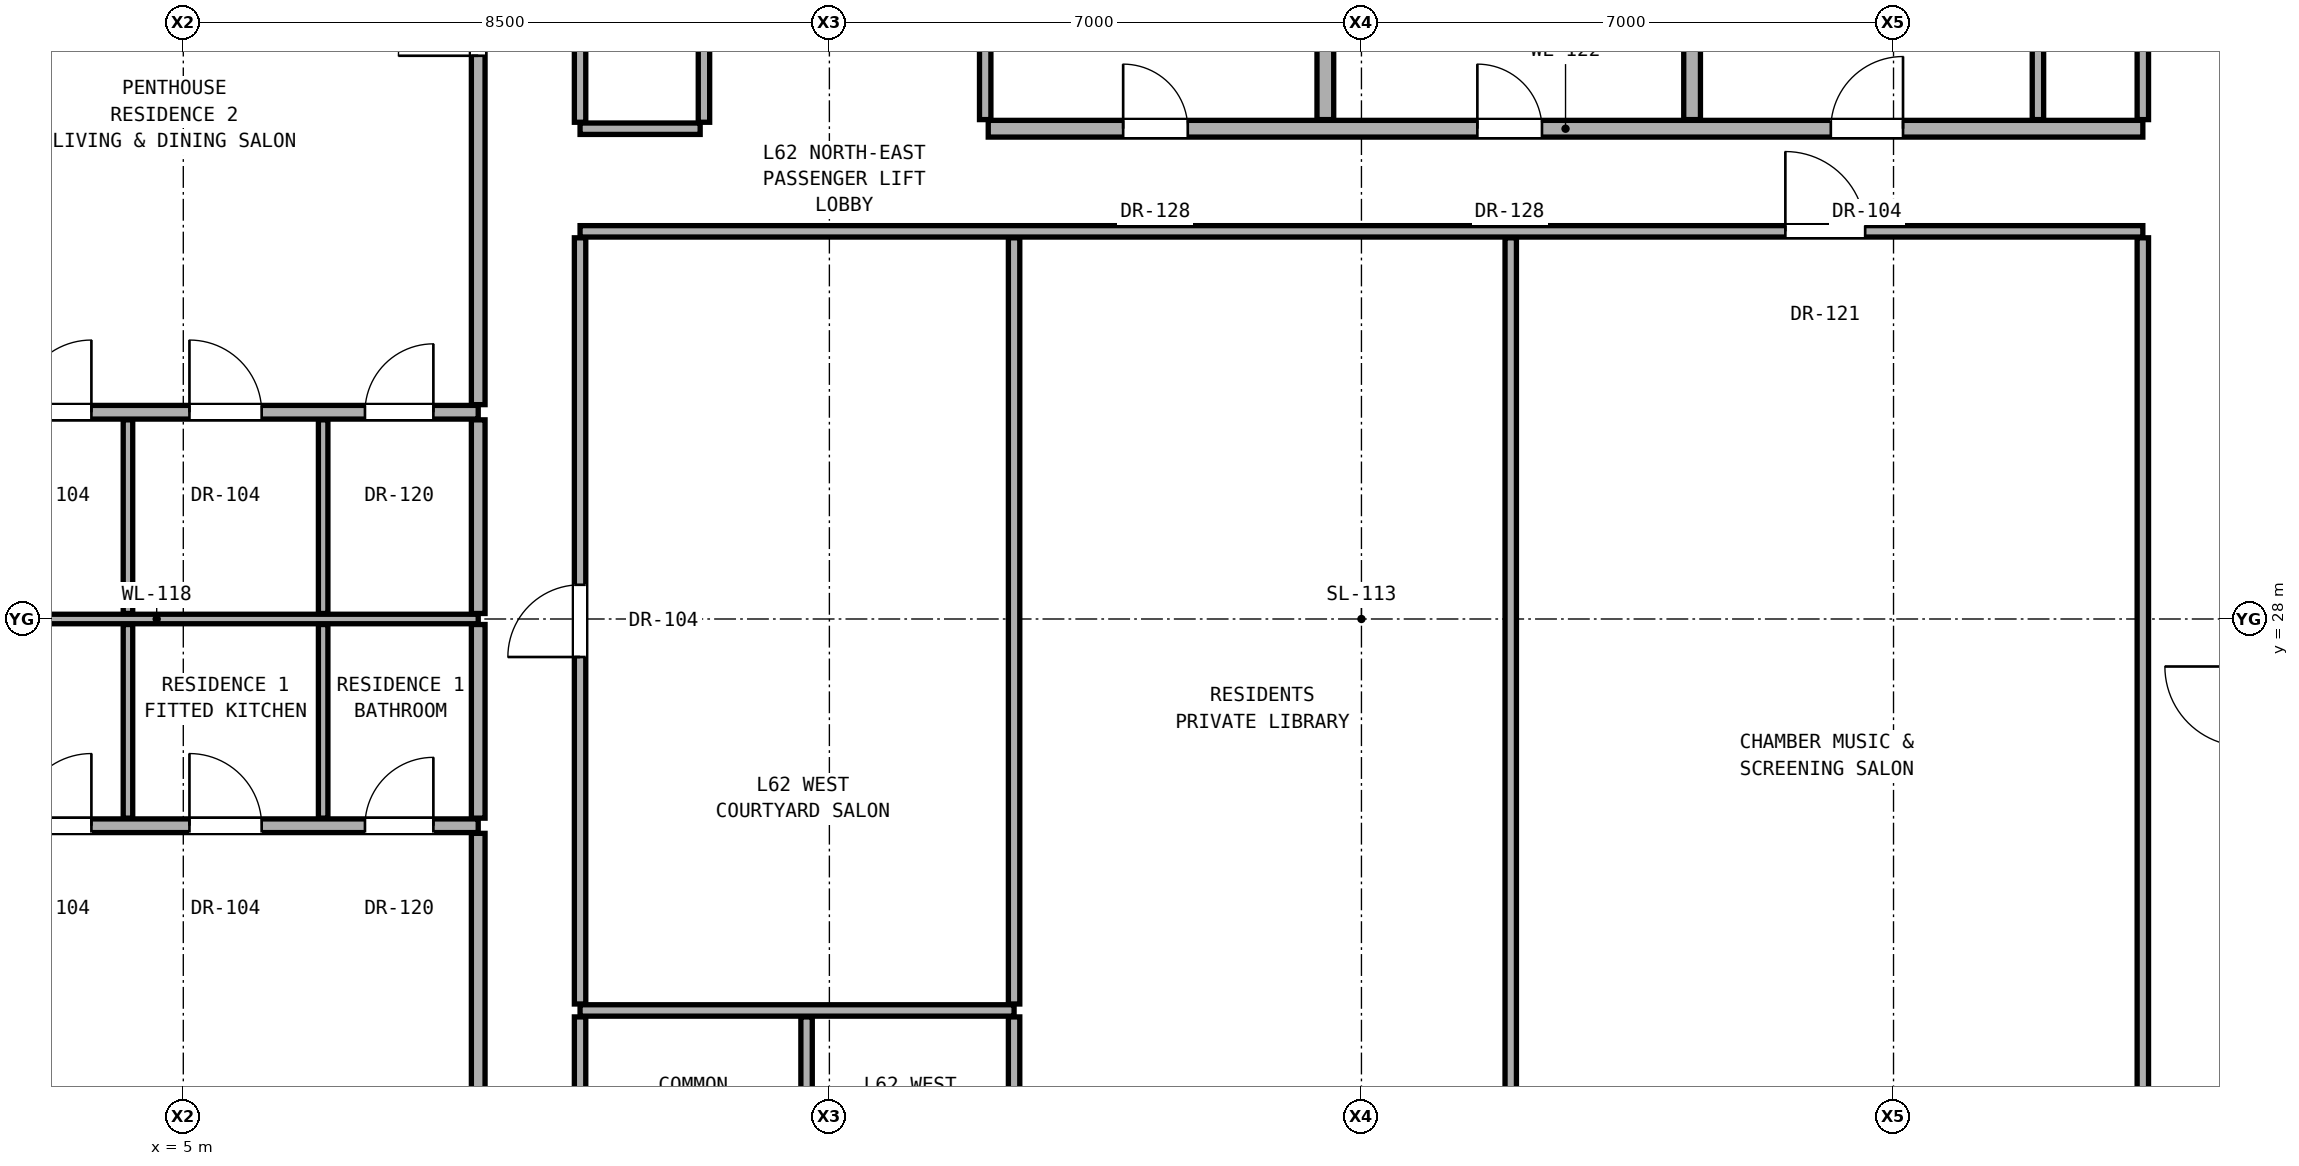
"""IFC4 building model, lengths in metres.
Left out: names, types, materials, properties, quantities, classifications, styles, units other than length and angle.
Written with IfcOpenShell. Run it as: python <this file> out.ifc"""

import sys

from ifc_helpers import new_model, si_unit, direction, frame, frame_2d, origin, place, context, subcontext, project, spatial, rectangle, extrude, element, fill, save


model = new_model("IFC4")
c1 = context("Model", 3, precision=1e-05, world=origin(), true_north=direction((0.0, 1.0)))
c2 = subcontext(c1, "Body", "Model", "MODEL_VIEW")
j1 = project(units=[si_unit("LENGTHUNIT", "METRE"), si_unit("PLANEANGLEUNIT", "RADIAN")], contexts=[c1])
p1 = place(None, origin())
s1 = spatial("IfcSite", under=j1, at=p1, CompositionType="ELEMENT")
p2 = place(p1, origin())
s2 = spatial("IfcBuilding", under=s1, at=p2, CompositionType="ELEMENT")
p3 = place(p2, frame((0.0, 0.0, 219.4)))
s3 = spatial("IfcBuildingStorey", under=s2, at=p3, CompositionType="ELEMENT", Elevation=219.4)
p4 = place(p3, frame((10.22, 22.85, 0.0), z_axis=(0.0, 0.0, 1.0), x_axis=(1.0, 0.0, 0.0)))
e1 = element("IfcWall", 1, at=p4, inside=s3, PredefinedType="PARTITIONING", context=c2, shape_type="SweptSolid", body=[
    extrude(rectangle(XDim=5.71, YDim=0.15, at=frame_2d((2.855, 0.0))), origin(), (0.0, 0.0, 1.0), 2.236),
])
p5 = place(p3, frame((0.42, 25.28, 0.0), z_axis=(0.0, 0.0, 1.0), x_axis=(1.0, 0.0, 0.0)))
e2 = element("IfcWall", 2, at=p5, inside=s3, PredefinedType="PARTITIONING", context=c2, shape_type="SweptSolid", body=[
    extrude(rectangle(XDim=8.46, YDim=0.18, at=frame_2d((4.23, 0.0))), origin(), (0.0, 0.0, 1.0), 2.319),
])
p6 = place(p5, frame((2.421, 0.0, 0.0)))
e3 = element("IfcOpeningElement", 3, at=p6, cuts=e2, PredefinedType="OPENING", context=c2, shape_type="SweptSolid", body=[
    extrude(rectangle(XDim=0.95, YDim=2.15, at=frame_2d((0.475, 1.075))), frame((0.0, 0.1, 0.0), z_axis=(0.0, -1.0, 0.0), x_axis=(1.0, 0.0, 0.0)), (0.0, 0.0, 1.0), 0.2),
])
p7 = place(p5, frame((4.661, 0.0, 0.0)))
e4 = element("IfcOpeningElement", 4, at=p7, cuts=e2, PredefinedType="OPENING", context=c2, shape_type="SweptSolid", body=[
    extrude(rectangle(XDim=0.95, YDim=2.15, at=frame_2d((0.475, 1.075))), frame((0.0, 0.1, 0.0), z_axis=(0.0, -1.0, 0.0), x_axis=(1.0, 0.0, 0.0)), (0.0, 0.0, 1.0), 0.2),
])
p8 = place(p5, frame((6.97, 0.0, 0.0)))
e5 = element("IfcOpeningElement", 5, at=p8, cuts=e2, PredefinedType="OPENING", context=c2, shape_type="SweptSolid", body=[
    extrude(rectangle(XDim=0.9, YDim=2.1, at=frame_2d((0.45, 1.05))), frame((0.0, 0.1, 0.0), z_axis=(0.0, -1.0, 0.0), x_axis=(1.0, 0.0, 0.0)), (0.0, 0.0, 1.0), 0.2),
])
p9 = place(p3, frame((0.42, 28.0, 0.0), z_axis=(0.0, 0.0, 1.0), x_axis=(1.0, 0.0, 0.0)))
e6 = element("IfcWall", 6, at=p9, inside=s3, PredefinedType="PARTITIONING", context=c2, shape_type="SweptSolid", body=[
    extrude(rectangle(XDim=8.46, YDim=0.125, at=frame_2d((4.23, 0.0))), origin(), (0.0, 0.0, 1.0), 2.319),
])
p10 = place(p3, frame((0.42, 30.72, 0.0), z_axis=(0.0, 0.0, 1.0), x_axis=(1.0, 0.0, 0.0)))
e7 = element("IfcWall", 7, at=p10, inside=s3, PredefinedType="PARTITIONING", context=c2, shape_type="SweptSolid", body=[
    extrude(rectangle(XDim=8.46, YDim=0.18, at=frame_2d((4.23, 0.0))), origin(), (0.0, 0.0, 1.0), 2.319),
])
p11 = place(p10, frame((2.421, 0.0, 0.0)))
e8 = element("IfcOpeningElement", 8, at=p11, cuts=e7, PredefinedType="OPENING", context=c2, shape_type="SweptSolid", body=[
    extrude(rectangle(XDim=0.95, YDim=2.15, at=frame_2d((0.475, 1.075))), frame((0.0, 0.1, 0.0), z_axis=(0.0, -1.0, 0.0), x_axis=(1.0, 0.0, 0.0)), (0.0, 0.0, 1.0), 0.2),
])
p12 = place(p10, frame((4.661, 0.0, 0.0)))
e9 = element("IfcOpeningElement", 9, at=p12, cuts=e7, PredefinedType="OPENING", context=c2, shape_type="SweptSolid", body=[
    extrude(rectangle(XDim=0.95, YDim=2.15, at=frame_2d((0.475, 1.075))), frame((0.0, 0.1, 0.0), z_axis=(0.0, -1.0, 0.0), x_axis=(1.0, 0.0, 0.0)), (0.0, 0.0, 1.0), 0.2),
])
p13 = place(p10, frame((6.97, 0.0, 0.0)))
e10 = element("IfcOpeningElement", 10, at=p13, cuts=e7, PredefinedType="OPENING", context=c2, shape_type="SweptSolid", body=[
    extrude(rectangle(XDim=0.9, YDim=2.1, at=frame_2d((0.45, 1.05))), frame((0.0, 0.1, 0.0), z_axis=(0.0, -1.0, 0.0), x_axis=(1.0, 0.0, 0.0)), (0.0, 0.0, 1.0), 0.2),
])
p14 = place(p3, frame((10.22, 33.1, 0.0), z_axis=(0.0, 0.0, 1.0), x_axis=(1.0, 0.0, 0.0)))
e11 = element("IfcWall", 11, at=p14, inside=s3, PredefinedType="PARTITIONING", context=c2, shape_type="SweptSolid", body=[
    extrude(rectangle(XDim=20.56, YDim=0.15, at=frame_2d((10.28, 0.0))), origin(), (0.0, 0.0, 1.0), 2.236),
])
p15 = place(p14, frame((15.857, 0.0, 0.0)))
e12 = element("IfcOpeningElement", 12, at=p15, cuts=e11, PredefinedType="OPENING", context=c2, shape_type="SweptSolid", body=[
    extrude(rectangle(XDim=1.05, YDim=2.2, at=frame_2d((0.525, 1.1))), frame((0.0, 0.085, 0.0), z_axis=(0.0, -1.0, 0.0), x_axis=(1.0, 0.0, 0.0)), (0.0, 0.0, 1.0), 0.17),
])
p16 = place(p3, frame((10.22, 34.45, 0.0), z_axis=(0.0, 0.0, 1.0), x_axis=(1.0, 0.0, 0.0)))
e13 = element("IfcWall", 13, at=p16, inside=s3, PredefinedType="PARTITIONING", context=c2, shape_type="SweptSolid", body=[
    extrude(rectangle(XDim=1.58, YDim=0.15, at=frame_2d((0.79, 0.0))), origin(), (0.0, 0.0, 1.0), 2.236),
])
p17 = place(p3, frame((15.59, 34.45, 0.0), z_axis=(0.0, 0.0, 1.0), x_axis=(1.0, 0.0, 0.0)))
e14 = element("IfcWall", 14, at=p17, inside=s3, PredefinedType="SOLIDWALL", context=c2, shape_type="SweptSolid", body=[
    extrude(rectangle(XDim=15.19, YDim=0.22, at=frame_2d((7.595, 0.0))), origin(), (0.0, 0.0, 1.0), 2.236),
])
p18 = place(p17, frame((6.435, 0.0, 0.0)))
e15 = element("IfcOpeningElement", 15, at=p18, cuts=e14, PredefinedType="OPENING", context=c2, shape_type="SweptSolid", body=[
    extrude(rectangle(XDim=0.85, YDim=2.01, at=frame_2d((0.425, 1.005))), frame((0.0, 0.12, 0.0), z_axis=(0.0, -1.0, 0.0), x_axis=(1.0, 0.0, 0.0)), (0.0, 0.0, 1.0), 0.24),
])
p19 = place(p17, frame((11.085, 0.0, 0.0)))
e16 = element("IfcOpeningElement", 16, at=p19, cuts=e14, PredefinedType="OPENING", context=c2, shape_type="SweptSolid", body=[
    extrude(rectangle(XDim=0.95, YDim=2.15, at=frame_2d((0.475, 1.075))), frame((0.0, 0.12, 0.0), z_axis=(0.0, -1.0, 0.0), x_axis=(1.0, 0.0, 0.0)), (0.0, 0.0, 1.0), 0.24),
])
p20 = place(p17, frame((1.775, 0.0, 0.0)))
e17 = element("IfcOpeningElement", 17, at=p20, cuts=e14, PredefinedType="OPENING", context=c2, shape_type="SweptSolid", body=[
    extrude(rectangle(XDim=0.85, YDim=2.01, at=frame_2d((0.425, 1.005))), frame((0.0, 0.12, 0.0), z_axis=(0.0, -1.0, 0.0), x_axis=(1.0, 0.0, 0.0)), (0.0, 0.0, 1.0), 0.24),
])
for number, where, z_axis, x_axis in (
    (18, (4.272, 25.38, 0.0), (0.0, 0.0, 1.0), (0.0, 1.0, 0.0)),
    (19, (4.272, 28.073, 0.0), (0.0, 0.0, 1.0), (0.0, 1.0, 0.0)),
    (20, (6.84, 25.38, 0.0), (0.0, 0.0, 1.0), (0.0, 1.0, 0.0)),
    (21, (6.84, 28.073, 0.0), (0.0, 0.0, 1.0), (0.0, 1.0, 0.0)),
):
    element("IfcWall", number, at=place(p3, frame(where, z_axis=z_axis, x_axis=x_axis)), inside=s3, PredefinedType="PARTITIONING", context=c2, shape_type="SweptSolid", body=[
        extrude(rectangle(XDim=2.548, YDim=0.125, at=frame_2d((1.274, 0.0))), origin(), (0.0, 0.0, 1.0), 3.1),
    ])
p21 = place(p3, frame((8.88, 14.95, 0.0), z_axis=(0.0, 0.0, 1.0), x_axis=(0.0, 1.0, 0.0)))
e22 = element("IfcWall", 22, at=p21, inside=s3, PredefinedType="PARTITIONING", context=c2, shape_type="SweptSolid", body=[
    extrude(rectangle(XDim=10.23, YDim=0.18, at=frame_2d((5.115, 0.0))), origin(), (0.0, 0.0, 1.0), 2.396),
])
p22 = place(p21, frame((4.59, 0.0, 0.0)))
e23 = element("IfcOpeningElement", 23, at=p22, cuts=e22, PredefinedType="OPENING", context=c2, shape_type="SweptSolid", body=[
    extrude(rectangle(XDim=1.05, YDim=2.2, at=frame_2d((0.525, 1.1))), frame((0.0, 0.1, 0.0), z_axis=(0.0, -1.0, 0.0), x_axis=(1.0, 0.0, 0.0)), (0.0, 0.0, 1.0), 0.2),
])
for number, where, z_axis, x_axis in (
    (24, (8.88, 25.38, 0.0), (0.0, 0.0, 1.0), (0.0, 1.0, 0.0)),
    (25, (8.88, 28.073, 0.0), (0.0, 0.0, 1.0), (0.0, 1.0, 0.0)),
):
    element("IfcWall", number, at=place(p3, frame(where, z_axis=z_axis, x_axis=x_axis)), inside=s3, PredefinedType="PARTITIONING", context=c2, shape_type="SweptSolid", body=[
        extrude(rectangle(XDim=2.548, YDim=0.18, at=frame_2d((1.274, 0.0))), origin(), (0.0, 0.0, 1.0), 3.1),
    ])
p23 = place(p3, frame((8.88, 30.82, 0.0), z_axis=(0.0, 0.0, 1.0), x_axis=(0.0, 1.0, 0.0)))
e26 = element("IfcWall", 26, at=p23, inside=s3, PredefinedType="PARTITIONING", context=c2, shape_type="SweptSolid", body=[
    extrude(rectangle(XDim=10.23, YDim=0.18, at=frame_2d((5.115, 0.0))), origin(), (0.0, 0.0, 1.0), 2.396),
])
p24 = place(p23, frame((4.59, 0.0, 0.0)))
e27 = element("IfcOpeningElement", 27, at=p24, cuts=e26, PredefinedType="OPENING", context=c2, shape_type="SweptSolid", body=[
    extrude(rectangle(XDim=1.05, YDim=2.2, at=frame_2d((0.525, 1.1))), frame((0.0, 0.1, 0.0), z_axis=(0.0, -1.0, 0.0), x_axis=(1.0, 0.0, 0.0)), (0.0, 0.0, 1.0), 0.2),
])
p25 = place(p3, frame((10.22, 19.985, 0.0), z_axis=(0.0, 0.0, 1.0), x_axis=(0.0, 1.0, 0.0)))
e28 = element("IfcWall", 28, at=p25, inside=s3, PredefinedType="PARTITIONING", context=c2, shape_type="SweptSolid", body=[
    extrude(rectangle(XDim=2.78, YDim=0.15, at=frame_2d((1.39, 0.0))), origin(), (0.0, 0.0, 1.0), 3.1),
])
p26 = place(p3, frame((10.22, 22.935, 0.0), z_axis=(0.0, 0.0, 1.0), x_axis=(0.0, 1.0, 0.0)))
e29 = element("IfcWall", 29, at=p26, inside=s3, PredefinedType="PARTITIONING", context=c2, shape_type="SweptSolid", body=[
    extrude(rectangle(XDim=10.08, YDim=0.15, at=frame_2d((5.04, 0.0))), origin(), (0.0, 0.0, 1.0), 2.396),
])
p27 = place(p26, frame((4.565, 0.0, 0.0)))
e30 = element("IfcOpeningElement", 30, at=p27, cuts=e29, PredefinedType="OPENING", context=c2, shape_type="SweptSolid", body=[
    extrude(rectangle(XDim=0.95, YDim=2.15, at=frame_2d((0.475, 1.075))), frame((0.0, 0.085, 0.0), z_axis=(0.0, -1.0, 0.0), x_axis=(1.0, 0.0, 0.0)), (0.0, 0.0, 1.0), 0.17),
])
p28 = place(p3, frame((10.22, 34.535, 0.0), z_axis=(0.0, 0.0, 1.0), x_axis=(0.0, 1.0, 0.0)))
e31 = element("IfcWall", 31, at=p28, inside=s3, PredefinedType="PARTITIONING", context=c2, shape_type="SweptSolid", body=[
    extrude(rectangle(XDim=9.13, YDim=0.15, at=frame_2d((4.565, 0.0))), origin(), (0.0, 0.0, 1.0), 2.492),
])
p29 = place(p3, frame((11.85, 34.535, 0.0), z_axis=(0.0, 0.0, 1.0), x_axis=(0.0, 1.0, 0.0)))
e32 = element("IfcWall", 32, at=p29, inside=s3, PredefinedType="PARTITIONING", context=c2, shape_type="SweptSolid", body=[
    extrude(rectangle(XDim=2.845, YDim=0.15, at=frame_2d((1.422, 0.0))), origin(), (0.0, 0.0, 1.0), 3.1),
])
p30 = place(p3, frame((13.2, 19.985, 0.0), z_axis=(0.0, 0.0, 1.0), x_axis=(0.0, 1.0, 0.0)))
e33 = element("IfcWall", 33, at=p30, inside=s3, PredefinedType="PARTITIONING", context=c2, shape_type="SweptSolid", body=[
    extrude(rectangle(XDim=2.78, YDim=0.15, at=frame_2d((1.39, 0.0))), origin(), (0.0, 0.0, 1.0), 3.1),
])
p31 = place(p3, frame((15.55, 34.57, 0.0), z_axis=(0.0, 0.0, 1.0), x_axis=(0.0, 1.0, 0.0)))
e34 = element("IfcWall", 34, at=p31, inside=s3, PredefinedType="PARTITIONING", context=c2, shape_type="SweptSolid", body=[
    extrude(rectangle(XDim=2.81, YDim=0.15, at=frame_2d((1.405, 0.0))), origin(), (0.0, 0.0, 1.0), 3.1),
])
p32 = place(p3, frame((15.93, 19.985, 0.0), z_axis=(0.0, 0.0, 1.0), x_axis=(0.0, 1.0, 0.0)))
e35 = element("IfcWall", 35, at=p32, inside=s3, PredefinedType="PARTITIONING", context=c2, shape_type="SweptSolid", body=[
    extrude(rectangle(XDim=2.78, YDim=0.15, at=frame_2d((1.39, 0.0))), origin(), (0.0, 0.0, 1.0), 3.1),
])
p33 = place(p3, frame((15.93, 22.935, 0.0), z_axis=(0.0, 0.0, 1.0), x_axis=(0.0, 1.0, 0.0)))
e36 = element("IfcWall", 36, at=p33, inside=s3, PredefinedType="PARTITIONING", context=c2, shape_type="SweptSolid", body=[
    extrude(rectangle(XDim=10.08, YDim=0.15, at=frame_2d((5.04, 0.0))), origin(), (0.0, 0.0, 1.0), 2.236),
])
p34 = place(p3, frame((20.025, 34.57, 0.0), z_axis=(0.0, 0.0, 1.0), x_axis=(0.0, 1.0, 0.0)))
e37 = element("IfcWall", 37, at=p34, inside=s3, PredefinedType="SOLIDWALL", context=c2, shape_type="SweptSolid", body=[
    extrude(rectangle(XDim=2.81, YDim=0.22, at=frame_2d((1.405, 0.0))), origin(), (0.0, 0.0, 1.0), 3.1),
])
p35 = place(p3, frame((22.464, 19.985, 0.0), z_axis=(0.0, 0.0, 1.0), x_axis=(0.0, 1.0, 0.0)))
e38 = element("IfcWall", 38, at=p35, inside=s3, PredefinedType="PARTITIONING", context=c2, shape_type="SweptSolid", body=[
    extrude(rectangle(XDim=13.03, YDim=0.15, at=frame_2d((6.515, 0.0))), origin(), (0.0, 0.0, 1.0), 2.236),
])
p36 = place(p3, frame((24.85, 34.57, 0.0), z_axis=(0.0, 0.0, 1.0), x_axis=(0.0, 1.0, 0.0)))
e39 = element("IfcWall", 39, at=p36, inside=s3, PredefinedType="SOLIDWALL", context=c2, shape_type="SweptSolid", body=[
    extrude(rectangle(XDim=2.81, YDim=0.22, at=frame_2d((1.405, 0.0))), origin(), (0.0, 0.0, 1.0), 3.1),
])
p37 = place(p3, frame((29.4, 34.57, 0.0), z_axis=(0.0, 0.0, 1.0), x_axis=(0.0, 1.0, 0.0)))
e40 = element("IfcWall", 40, at=p37, inside=s3, PredefinedType="PARTITIONING", context=c2, shape_type="SweptSolid", body=[
    extrude(rectangle(XDim=2.81, YDim=0.15, at=frame_2d((1.405, 0.0))), origin(), (0.0, 0.0, 1.0), 3.1),
])
p38 = place(p3, frame((30.78, 19.985, 0.0), z_axis=(0.0, 0.0, 1.0), x_axis=(0.0, 1.0, 0.0)))
e41 = element("IfcWall", 41, at=p38, inside=s3, PredefinedType="PARTITIONING", context=c2, shape_type="SweptSolid", body=[
    extrude(rectangle(XDim=13.03, YDim=0.15, at=frame_2d((6.515, 0.0))), origin(), (0.0, 0.0, 1.0), 2.396),
])
p39 = place(p3, frame((30.78, 34.57, 0.0), z_axis=(0.0, 0.0, 1.0), x_axis=(0.0, 1.0, 0.0)))
e42 = element("IfcWall", 42, at=p39, inside=s3, PredefinedType="PARTITIONING", context=c2, shape_type="SweptSolid", body=[
    extrude(rectangle(XDim=9.095, YDim=0.15, at=frame_2d((4.547, 0.0))), origin(), (0.0, 0.0, 1.0), 2.492),
])
p40 = place(p18, origin())
e43 = element("IfcDoor", 43, at=p40, inside=s3, OperationType="SINGLE_SWING_LEFT", PredefinedType="DOOR", context=c2, shape_type="SweptSolid", body=[
    extrude(rectangle(XDim=0.85, YDim=2.01, at=frame_2d((0.425, 1.005))), frame((0.0, 0.025, 0.0), z_axis=(0.0, -1.0, 0.0), x_axis=(1.0, 0.0, 0.0)), (0.0, 0.0, 1.0), 0.05),
])
fill(e15, e43)
p41 = place(p19, origin())
e44 = element("IfcDoor", 44, at=p41, inside=s3, OperationType="SINGLE_SWING_RIGHT", PredefinedType="DOOR", context=c2, shape_type="SweptSolid", body=[
    extrude(rectangle(XDim=0.95, YDim=2.15, at=frame_2d((0.475, 1.075))), frame((0.0, 0.025, 0.0), z_axis=(0.0, -1.0, 0.0), x_axis=(1.0, 0.0, 0.0)), (0.0, 0.0, 1.0), 0.05),
])
fill(e16, e44)
p42 = place(p20, origin())
e45 = element("IfcDoor", 45, at=p42, inside=s3, OperationType="SINGLE_SWING_LEFT", PredefinedType="DOOR", context=c2, shape_type="SweptSolid", body=[
    extrude(rectangle(XDim=0.85, YDim=2.01, at=frame_2d((0.425, 1.005))), frame((0.0, 0.025, 0.0), z_axis=(0.0, -1.0, 0.0), x_axis=(1.0, 0.0, 0.0)), (0.0, 0.0, 1.0), 0.05),
])
fill(e17, e45)
p43 = place(p6, origin())
e46 = element("IfcDoor", 46, at=p43, inside=s3, OperationType="SINGLE_SWING_RIGHT", PredefinedType="DOOR", context=c2, shape_type="SweptSolid", body=[
    extrude(rectangle(XDim=0.95, YDim=2.15, at=frame_2d((0.475, 1.075))), frame((0.0, 0.025, 0.0), z_axis=(0.0, -1.0, 0.0), x_axis=(1.0, 0.0, 0.0)), (0.0, 0.0, 1.0), 0.05),
])
fill(e3, e46)
p44 = place(p7, origin())
e47 = element("IfcDoor", 47, at=p44, inside=s3, OperationType="SINGLE_SWING_LEFT", PredefinedType="DOOR", context=c2, shape_type="SweptSolid", body=[
    extrude(rectangle(XDim=0.95, YDim=2.15, at=frame_2d((0.475, 1.075))), frame((0.0, 0.025, 0.0), z_axis=(0.0, -1.0, 0.0), x_axis=(1.0, 0.0, 0.0)), (0.0, 0.0, 1.0), 0.05),
])
fill(e4, e47)
p45 = place(p8, origin())
e48 = element("IfcDoor", 48, at=p45, inside=s3, OperationType="SINGLE_SWING_RIGHT", PredefinedType="DOOR", context=c2, shape_type="SweptSolid", body=[
    extrude(rectangle(XDim=0.9, YDim=2.1, at=frame_2d((0.45, 1.05))), frame((0.0, 0.025, 0.0), z_axis=(0.0, -1.0, 0.0), x_axis=(1.0, 0.0, 0.0)), (0.0, 0.0, 1.0), 0.05),
])
fill(e5, e48)
p46 = place(p24, origin())
e49 = element("IfcDoor", 49, at=p46, inside=s3, OperationType="SINGLE_SWING_LEFT", PredefinedType="DOOR", context=c2, shape_type="SweptSolid", body=[
    extrude(rectangle(XDim=1.05, YDim=2.2, at=frame_2d((0.525, 1.1))), frame((0.0, 0.025, 0.0), z_axis=(0.0, -1.0, 0.0), x_axis=(1.0, 0.0, 0.0)), (0.0, 0.0, 1.0), 0.05),
])
fill(e27, e49)
p47 = place(p11, origin())
e50 = element("IfcDoor", 50, at=p47, inside=s3, OperationType="SINGLE_SWING_RIGHT", PredefinedType="DOOR", context=c2, shape_type="SweptSolid", body=[
    extrude(rectangle(XDim=0.95, YDim=2.15, at=frame_2d((0.475, 1.075))), frame((0.0, 0.025, 0.0), z_axis=(0.0, -1.0, 0.0), x_axis=(1.0, 0.0, 0.0)), (0.0, 0.0, 1.0), 0.05),
])
fill(e8, e50)
p48 = place(p12, origin())
e51 = element("IfcDoor", 51, at=p48, inside=s3, OperationType="SINGLE_SWING_LEFT", PredefinedType="DOOR", context=c2, shape_type="SweptSolid", body=[
    extrude(rectangle(XDim=0.95, YDim=2.15, at=frame_2d((0.475, 1.075))), frame((0.0, 0.025, 0.0), z_axis=(0.0, -1.0, 0.0), x_axis=(1.0, 0.0, 0.0)), (0.0, 0.0, 1.0), 0.05),
])
fill(e9, e51)
p49 = place(p13, origin())
e52 = element("IfcDoor", 52, at=p49, inside=s3, OperationType="SINGLE_SWING_RIGHT", PredefinedType="DOOR", context=c2, shape_type="SweptSolid", body=[
    extrude(rectangle(XDim=0.9, YDim=2.1, at=frame_2d((0.45, 1.05))), frame((0.0, 0.025, 0.0), z_axis=(0.0, -1.0, 0.0), x_axis=(1.0, 0.0, 0.0)), (0.0, 0.0, 1.0), 0.05),
])
fill(e10, e52)
p50 = place(p27, origin())
e53 = element("IfcDoor", 53, at=p50, inside=s3, OperationType="SINGLE_SWING_LEFT", PredefinedType="DOOR", context=c2, shape_type="SweptSolid", body=[
    extrude(rectangle(XDim=0.95, YDim=2.15, at=frame_2d((0.475, 1.075))), frame((0.0, 0.025, 0.0), z_axis=(0.0, -1.0, 0.0), x_axis=(1.0, 0.0, 0.0)), (0.0, 0.0, 1.0), 0.05),
])
fill(e30, e53)
p51 = place(p15, origin())
e54 = element("IfcDoor", 54, at=p51, inside=s3, OperationType="SINGLE_SWING_LEFT", PredefinedType="DOOR", context=c2, shape_type="SweptSolid", body=[
    extrude(rectangle(XDim=1.05, YDim=2.2, at=frame_2d((0.525, 1.1))), frame((0.0, 0.025, 0.0), z_axis=(0.0, -1.0, 0.0), x_axis=(1.0, 0.0, 0.0)), (0.0, 0.0, 1.0), 0.05),
])
fill(e12, e54)
save(model, sys.argv[1])
